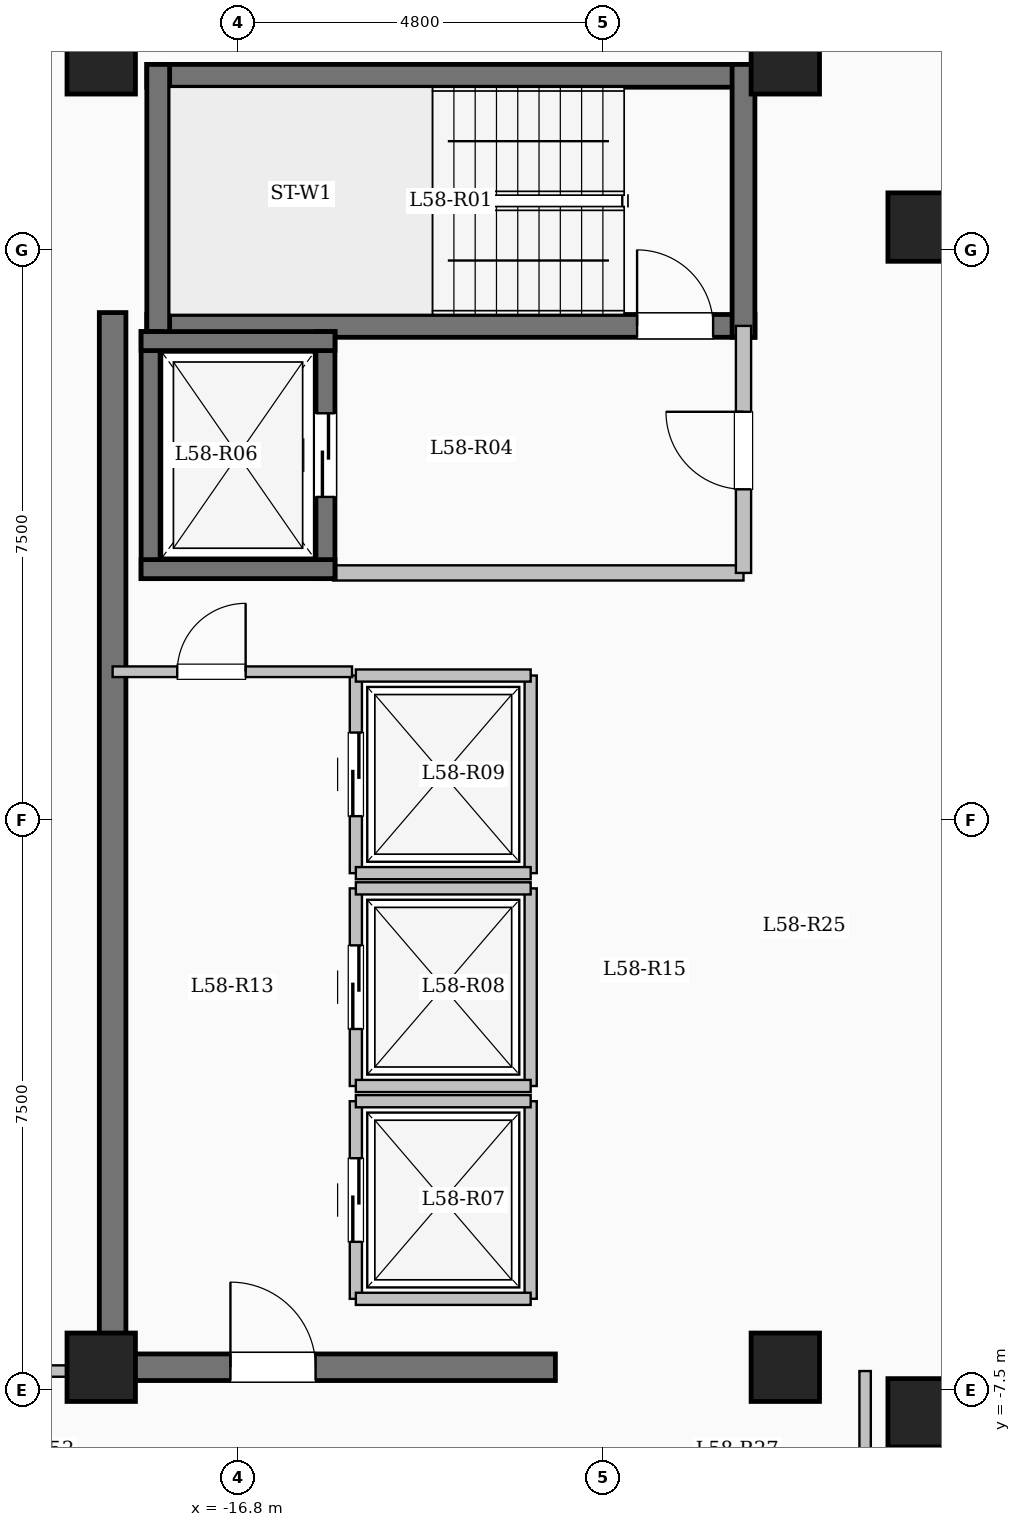
"""IFC4 building model, lengths in metres.
Left out: names, types, materials, properties, quantities, classifications, styles, units other than length and angle.
Written with IfcOpenShell. Run it as: python <this file> out.ifc"""

import sys

from ifc_helpers import new_model, si_unit, direction, frame, frame_2d, origin, origin_2d, place, context, subcontext, project, spatial, rectangle, extrude, element, fill, save


model = new_model("IFC4")
c1 = context("Model", 3, precision=1e-05, world=origin(), true_north=direction((0.0, 1.0)))
c2 = subcontext(c1, "Body", "Model", "MODEL_VIEW")
j1 = project(units=[si_unit("LENGTHUNIT", "METRE"), si_unit("PLANEANGLEUNIT", "RADIAN")], contexts=[c1])
p1 = place(None, origin())
s1 = spatial("IfcSite", under=j1, at=p1, CompositionType="ELEMENT")
p2 = place(p1, origin())
s2 = spatial("IfcBuilding", under=s1, at=p2, CompositionType="ELEMENT")
p3 = place(p2, frame((0.0, 0.0, 213.7)))
s3 = spatial("IfcBuildingStorey", under=s2, at=p3, CompositionType="ELEMENT", Elevation=213.7)
for number, where, z_axis, x_axis in (
    (1, (-7.8, -7.8, 0.0), (0.0, 0.0, 1.0), (1.0, 0.0, 0.0)),
    (2, (-7.8, 7.8, 0.0), (0.0, 0.0, 1.0), (1.0, 0.0, 0.0)),
    (3, (-9.6, -7.2, 0.0), (0.0, 0.0, 1.0), (1.0, 0.0, 0.0)),
    (4, (-9.6, 10.0, 0.0), (0.0, 0.0, 1.0), (1.0, 0.0, 0.0)),
    (5, (-18.6, -7.2, 0.0), (0.0, 0.0, 1.0), (1.0, 0.0, 0.0)),
    (6, (-18.6, 10.0, 0.0), (0.0, 0.0, 1.0), (1.0, 0.0, 0.0)),
):
    element("IfcColumn", number, at=place(p3, frame(where, z_axis=z_axis, x_axis=x_axis)), inside=s3, PredefinedType="COLUMN", context=c2, shape_type="SweptSolid", body=[
        extrude(rectangle(XDim=0.9, YDim=0.9, at=origin_2d()), origin(), (0.0, 0.0, 1.0), 3.35),
    ])
p4 = place(p3, frame((-18.0, 9.79, 0.0), z_axis=(0.0, 0.0, 1.0), x_axis=(1.0, 0.0, 0.0)))
e7 = element("IfcWall", 7, at=p4, inside=s3, PredefinedType="SHEAR", context=c2, shape_type="SweptSolid", body=[
    extrude(rectangle(XDim=8.0, YDim=0.3, at=frame_2d((4.0, 0.0))), origin(), (0.0, 0.0, 1.0), 3.35),
])
p5 = place(p3, frame((-18.0, 6.5, 0.0), z_axis=(0.0, 0.0, 1.0), x_axis=(1.0, 0.0, 0.0)))
e8 = element("IfcWall", 8, at=p5, inside=s3, PredefinedType="SHEAR", context=c2, shape_type="SweptSolid", body=[
    extrude(rectangle(XDim=8.0, YDim=0.3, at=frame_2d((4.0, 0.0))), origin(), (0.0, 0.0, 1.0), 3.35),
])
p6 = place(p5, frame((6.45, 0.0, 0.0)))
e9 = element("IfcOpeningElement", 9, at=p6, cuts=e8, PredefinedType="OPENING", context=c2, shape_type="SweptSolid", body=[
    extrude(rectangle(XDim=1.0, YDim=2.15, at=frame_2d((0.5, 1.075))), frame((0.0, 0.16, 0.0), z_axis=(0.0, -1.0, 0.0), x_axis=(1.0, 0.0, 0.0)), (0.0, 0.0, 1.0), 0.32),
])
for number, where, z_axis, x_axis in (
    (10, (-17.85, 6.35, 0.0), (0.0, 0.0, 1.0), (0.0, 1.0, 0.0)),
    (11, (-10.15, 6.35, 0.0), (0.0, 0.0, 1.0), (0.0, 1.0, 0.0)),
):
    element("IfcWall", number, at=place(p3, frame(where, z_axis=z_axis, x_axis=x_axis)), inside=s3, PredefinedType="SHEAR", context=c2, shape_type="SweptSolid", body=[
        extrude(rectangle(XDim=3.59, YDim=0.3, at=frame_2d((1.795, 0.0))), origin(), (0.0, 0.0, 1.0), 3.35),
    ])
p7 = place(p3, frame((-15.55, 3.25, 0.0), z_axis=(0.0, 0.0, 1.0), x_axis=(1.0, 0.0, 0.0)))
e12 = element("IfcWall", 12, at=p7, inside=s3, PredefinedType="SOLIDWALL", context=c2, shape_type="SweptSolid", body=[
    extrude(rectangle(XDim=5.4, YDim=0.2, at=frame_2d((2.7, 0.0))), origin(), (0.0, 0.0, 1.0), 3.1),
])
p8 = place(p3, frame((-10.15, 3.25, 0.0), z_axis=(0.0, 0.0, 1.0), x_axis=(0.0, 1.0, 0.0)))
e13 = element("IfcWall", 13, at=p8, inside=s3, PredefinedType="SOLIDWALL", context=c2, shape_type="SweptSolid", body=[
    extrude(rectangle(XDim=3.25, YDim=0.2, at=frame_2d((1.625, 0.0))), origin(), (0.0, 0.0, 1.0), 3.1),
])
p9 = place(p8, frame((1.1, 0.0, 0.0)))
e14 = element("IfcOpeningElement", 14, at=p9, cuts=e13, PredefinedType="OPENING", context=c2, shape_type="SweptSolid", body=[
    extrude(rectangle(XDim=1.02, YDim=2.15, at=frame_2d((0.51, 1.075))), frame((0.0, 0.11, 0.0), z_axis=(0.0, -1.0, 0.0), x_axis=(1.0, 0.0, 0.0)), (0.0, 0.0, 1.0), 0.22),
])
p10 = place(p3, frame((-17.95, 3.175, 0.0), z_axis=(0.0, 0.0, 1.0), x_axis=(0.0, 1.0, 0.0)))
e15 = element("IfcWall", 15, at=p10, inside=s3, PredefinedType="SHEAR", context=c2, shape_type="SweptSolid", body=[
    extrude(rectangle(XDim=3.25, YDim=0.25, at=frame_2d((1.625, 0.0))), origin(), (0.0, 0.0, 1.0), 3.35),
])
p11 = place(p3, frame((-15.65, 3.175, 0.0), z_axis=(0.0, 0.0, 1.0), x_axis=(0.0, 1.0, 0.0)))
e16 = element("IfcWall", 16, at=p11, inside=s3, PredefinedType="SHEAR", context=c2, shape_type="SweptSolid", body=[
    extrude(rectangle(XDim=3.25, YDim=0.25, at=frame_2d((1.625, 0.0))), origin(), (0.0, 0.0, 1.0), 3.35),
])
p12 = place(p11, frame((1.075, 0.0, 0.0)))
e17 = element("IfcOpeningElement", 17, at=p12, cuts=e16, PredefinedType="OPENING", context=c2, shape_type="SweptSolid", body=[
    extrude(rectangle(XDim=1.1, YDim=2.15, at=frame_2d((0.55, 1.075))), frame((0.0, 0.135, 0.0), z_axis=(0.0, -1.0, 0.0), x_axis=(1.0, 0.0, 0.0)), (0.0, 0.0, 1.0), 0.27),
])
for number, where, z_axis, x_axis in (
    (18, (-18.075, 3.3, 0.0), (0.0, 0.0, 1.0), (1.0, 0.0, 0.0)),
    (19, (-18.075, 6.3, 0.0), (0.0, 0.0, 1.0), (1.0, 0.0, 0.0)),
):
    element("IfcWall", number, at=place(p3, frame(where, z_axis=z_axis, x_axis=x_axis)), inside=s3, PredefinedType="SHEAR", context=c2, shape_type="SweptSolid", body=[
        extrude(rectangle(XDim=2.55, YDim=0.25, at=frame_2d((1.275, 0.0))), origin(), (0.0, 0.0, 1.0), 3.35),
    ])
p13 = place(p3, frame((-15.25, -6.3, 0.0), z_axis=(0.0, 0.0, 1.0), x_axis=(0.0, 1.0, 0.0)))
e20 = element("IfcWall", 20, at=p13, inside=s3, PredefinedType="SOLIDWALL", context=c2, shape_type="SweptSolid", body=[
    extrude(rectangle(XDim=2.6, YDim=0.16, at=frame_2d((1.3, 0.0))), origin(), (0.0, 0.0, 1.0), 3.1),
])
p14 = place(p13, frame((0.75, 0.0, 0.0)))
e21 = element("IfcOpeningElement", 21, at=p14, cuts=e20, PredefinedType="OPENING", context=c2, shape_type="SweptSolid", body=[
    extrude(rectangle(XDim=1.1, YDim=2.15, at=frame_2d((0.55, 1.075))), frame((0.0, 0.09, 0.0), z_axis=(0.0, -1.0, 0.0), x_axis=(1.0, 0.0, 0.0)), (0.0, 0.0, 1.0), 0.18),
])
p15 = place(p3, frame((-12.95, -6.3, 0.0), z_axis=(0.0, 0.0, 1.0), x_axis=(0.0, 1.0, 0.0)))
e22 = element("IfcWall", 22, at=p15, inside=s3, PredefinedType="SOLIDWALL", context=c2, shape_type="SweptSolid", body=[
    extrude(rectangle(XDim=2.6, YDim=0.16, at=frame_2d((1.3, 0.0))), origin(), (0.0, 0.0, 1.0), 3.1),
])
for number, where, z_axis, x_axis in (
    (23, (-15.25, -6.3, 0.0), (0.0, 0.0, 1.0), (1.0, 0.0, 0.0)),
    (24, (-15.25, -3.7, 0.0), (0.0, 0.0, 1.0), (1.0, 0.0, 0.0)),
):
    element("IfcWall", number, at=place(p3, frame(where, z_axis=z_axis, x_axis=x_axis)), inside=s3, PredefinedType="SOLIDWALL", context=c2, shape_type="SweptSolid", body=[
        extrude(rectangle(XDim=2.3, YDim=0.16, at=frame_2d((1.15, 0.0))), origin(), (0.0, 0.0, 1.0), 3.1),
    ])
p16 = place(p3, frame((-15.25, -3.5, 0.0), z_axis=(0.0, 0.0, 1.0), x_axis=(0.0, 1.0, 0.0)))
e25 = element("IfcWall", 25, at=p16, inside=s3, PredefinedType="SOLIDWALL", context=c2, shape_type="SweptSolid", body=[
    extrude(rectangle(XDim=2.6, YDim=0.16, at=frame_2d((1.3, 0.0))), origin(), (0.0, 0.0, 1.0), 3.1),
])
p17 = place(p16, frame((0.75, 0.0, 0.0)))
e26 = element("IfcOpeningElement", 26, at=p17, cuts=e25, PredefinedType="OPENING", context=c2, shape_type="SweptSolid", body=[
    extrude(rectangle(XDim=1.1, YDim=2.15, at=frame_2d((0.55, 1.075))), frame((0.0, 0.09, 0.0), z_axis=(0.0, -1.0, 0.0), x_axis=(1.0, 0.0, 0.0)), (0.0, 0.0, 1.0), 0.18),
])
p18 = place(p3, frame((-12.95, -3.5, 0.0), z_axis=(0.0, 0.0, 1.0), x_axis=(0.0, 1.0, 0.0)))
e27 = element("IfcWall", 27, at=p18, inside=s3, PredefinedType="SOLIDWALL", context=c2, shape_type="SweptSolid", body=[
    extrude(rectangle(XDim=2.6, YDim=0.16, at=frame_2d((1.3, 0.0))), origin(), (0.0, 0.0, 1.0), 3.1),
])
for number, where, z_axis, x_axis in (
    (28, (-15.25, -3.5, 0.0), (0.0, 0.0, 1.0), (1.0, 0.0, 0.0)),
    (29, (-15.25, -0.9, 0.0), (0.0, 0.0, 1.0), (1.0, 0.0, 0.0)),
):
    element("IfcWall", number, at=place(p3, frame(where, z_axis=z_axis, x_axis=x_axis)), inside=s3, PredefinedType="SOLIDWALL", context=c2, shape_type="SweptSolid", body=[
        extrude(rectangle(XDim=2.3, YDim=0.16, at=frame_2d((1.15, 0.0))), origin(), (0.0, 0.0, 1.0), 3.1),
    ])
p19 = place(p3, frame((-15.25, -0.7, 0.0), z_axis=(0.0, 0.0, 1.0), x_axis=(0.0, 1.0, 0.0)))
e30 = element("IfcWall", 30, at=p19, inside=s3, PredefinedType="SOLIDWALL", context=c2, shape_type="SweptSolid", body=[
    extrude(rectangle(XDim=2.6, YDim=0.16, at=frame_2d((1.3, 0.0))), origin(), (0.0, 0.0, 1.0), 3.1),
])
p20 = place(p19, frame((0.75, 0.0, 0.0)))
e31 = element("IfcOpeningElement", 31, at=p20, cuts=e30, PredefinedType="OPENING", context=c2, shape_type="SweptSolid", body=[
    extrude(rectangle(XDim=1.1, YDim=2.15, at=frame_2d((0.55, 1.075))), frame((0.0, 0.09, 0.0), z_axis=(0.0, -1.0, 0.0), x_axis=(1.0, 0.0, 0.0)), (0.0, 0.0, 1.0), 0.18),
])
p21 = place(p3, frame((-12.95, -0.7, 0.0), z_axis=(0.0, 0.0, 1.0), x_axis=(0.0, 1.0, 0.0)))
e32 = element("IfcWall", 32, at=p21, inside=s3, PredefinedType="SOLIDWALL", context=c2, shape_type="SweptSolid", body=[
    extrude(rectangle(XDim=2.6, YDim=0.16, at=frame_2d((1.3, 0.0))), origin(), (0.0, 0.0, 1.0), 3.1),
])
for number, where, z_axis, x_axis in (
    (33, (-15.25, -0.7, 0.0), (0.0, 0.0, 1.0), (1.0, 0.0, 0.0)),
    (34, (-15.25, 1.9, 0.0), (0.0, 0.0, 1.0), (1.0, 0.0, 0.0)),
):
    element("IfcWall", number, at=place(p3, frame(where, z_axis=z_axis, x_axis=x_axis)), inside=s3, PredefinedType="SOLIDWALL", context=c2, shape_type="SweptSolid", body=[
        extrude(rectangle(XDim=2.3, YDim=0.16, at=frame_2d((1.15, 0.0))), origin(), (0.0, 0.0, 1.0), 3.1),
    ])
p22 = place(p3, frame((-18.45, -7.375, 0.0), z_axis=(0.0, 0.0, 1.0), x_axis=(0.0, 1.0, 0.0)))
e35 = element("IfcWall", 35, at=p22, inside=s3, PredefinedType="SHEAR", context=c2, shape_type="SweptSolid", body=[
    extrude(rectangle(XDim=14.05, YDim=0.35, at=frame_2d((7.025, 0.0))), origin(), (0.0, 0.0, 1.0), 3.35),
])
p23 = place(p3, frame((-18.625, -7.2, 0.0), z_axis=(0.0, 0.0, 1.0), x_axis=(1.0, 0.0, 0.0)))
e36 = element("IfcWall", 36, at=p23, inside=s3, PredefinedType="SHEAR", context=c2, shape_type="SweptSolid", body=[
    extrude(rectangle(XDim=6.0, YDim=0.35, at=frame_2d((3.0, 0.0))), origin(), (0.0, 0.0, 1.0), 3.35),
])
p24 = place(p23, frame((1.725, 0.0, 0.0)))
e37 = element("IfcOpeningElement", 37, at=p24, cuts=e36, PredefinedType="OPENING", context=c2, shape_type="SweptSolid", body=[
    extrude(rectangle(XDim=1.12, YDim=2.15, at=frame_2d((0.56, 1.075))), frame((0.0, 0.185, 0.0), z_axis=(0.0, -1.0, 0.0), x_axis=(1.0, 0.0, 0.0)), (0.0, 0.0, 1.0), 0.37),
])
p25 = place(p3, frame((-18.45, 1.95, 0.0), z_axis=(0.0, 0.0, 1.0), x_axis=(1.0, 0.0, 0.0)))
e38 = element("IfcWall", 38, at=p25, inside=s3, PredefinedType="PARTITIONING", context=c2, shape_type="SweptSolid", body=[
    extrude(rectangle(XDim=3.15, YDim=0.14, at=frame_2d((1.575, 0.0))), origin(), (0.0, 0.0, 1.0), 3.1),
])
p26 = place(p25, frame((0.85, 0.0, 0.0)))
e39 = element("IfcOpeningElement", 39, at=p26, cuts=e38, PredefinedType="OPENING", context=c2, shape_type="SweptSolid", body=[
    extrude(rectangle(XDim=0.9, YDim=2.08, at=frame_2d((0.45, 1.04))), frame((0.0, 0.08, 0.0), z_axis=(0.0, -1.0, 0.0), x_axis=(1.0, 0.0, 0.0)), (0.0, 0.0, 1.0), 0.16),
])
p27 = place(p3, frame((-8.55, -9.4, 0.0), z_axis=(0.0, 0.0, 1.0), x_axis=(0.0, 1.0, 0.0)))
e40 = element("IfcWall", 40, at=p27, inside=s3, PredefinedType="PARTITIONING", context=c2, shape_type="SweptSolid", body=[
    extrude(rectangle(XDim=2.15, YDim=0.15, at=frame_2d((1.075, 0.0))), origin(), (0.0, 0.0, 1.0), 3.1),
])
p28 = place(p3, frame((-23.58, -7.25, 0.0), z_axis=(0.0, 0.0, 1.0), x_axis=(1.0, 0.0, 0.0)))
e41 = element("IfcWall", 41, at=p28, inside=s3, PredefinedType="PARTITIONING", context=c2, shape_type="SweptSolid", body=[
    extrude(rectangle(XDim=5.13, YDim=0.15, at=frame_2d((2.565, 0.0))), origin(), (0.0, 0.0, 1.0), 3.1),
])
p29 = place(p28, frame((2.08, 0.0, 0.0)))
e42 = element("IfcOpeningElement", 42, at=p29, cuts=e41, PredefinedType="OPENING", context=c2, shape_type="SweptSolid", body=[
    extrude(rectangle(XDim=1.08, YDim=2.15, at=frame_2d((0.54, 1.075))), frame((0.0, 0.085, 0.0), z_axis=(0.0, -1.0, 0.0), x_axis=(1.0, 0.0, 0.0)), (0.0, 0.0, 1.0), 0.17),
])
p30 = place(p6, origin())
e43 = element("IfcDoor", 43, at=p30, inside=s3, OperationType="SINGLE_SWING_LEFT", PredefinedType="DOOR", context=c2, shape_type="SweptSolid", body=[
    extrude(rectangle(XDim=1.0, YDim=2.15, at=frame_2d((0.5, 1.075))), frame((0.0, 0.025, 0.0), z_axis=(0.0, -1.0, 0.0), x_axis=(1.0, 0.0, 0.0)), (0.0, 0.0, 1.0), 0.05),
])
fill(e9, e43)
p31 = place(p9, origin())
e44 = element("IfcDoor", 44, at=p31, inside=s3, OperationType="SINGLE_SWING_RIGHT", PredefinedType="DOOR", context=c2, shape_type="SweptSolid", body=[
    extrude(rectangle(XDim=1.02, YDim=2.15, at=frame_2d((0.51, 1.075))), frame((0.0, 0.025, 0.0), z_axis=(0.0, -1.0, 0.0), x_axis=(1.0, 0.0, 0.0)), (0.0, 0.0, 1.0), 0.05),
])
fill(e14, e44)
p32 = place(p12, origin())
e45 = element("IfcDoor", 45, at=p32, inside=s3, OperationType="SLIDING_TO_LEFT", PredefinedType="DOOR", context=c2, shape_type="SweptSolid", body=[
    extrude(rectangle(XDim=1.1, YDim=2.15, at=frame_2d((0.55, 1.075))), frame((0.0, 0.025, 0.0), z_axis=(0.0, -1.0, 0.0), x_axis=(1.0, 0.0, 0.0)), (0.0, 0.0, 1.0), 0.05),
])
fill(e17, e45)
p33 = place(p14, origin())
e46 = element("IfcDoor", 46, at=p33, inside=s3, OperationType="SLIDING_TO_LEFT", PredefinedType="DOOR", context=c2, shape_type="SweptSolid", body=[
    extrude(rectangle(XDim=1.1, YDim=2.15, at=frame_2d((0.55, 1.075))), frame((0.0, 0.025, 0.0), z_axis=(0.0, -1.0, 0.0), x_axis=(1.0, 0.0, 0.0)), (0.0, 0.0, 1.0), 0.05),
])
fill(e21, e46)
p34 = place(p17, origin())
e47 = element("IfcDoor", 47, at=p34, inside=s3, OperationType="SLIDING_TO_LEFT", PredefinedType="DOOR", context=c2, shape_type="SweptSolid", body=[
    extrude(rectangle(XDim=1.1, YDim=2.15, at=frame_2d((0.55, 1.075))), frame((0.0, 0.025, 0.0), z_axis=(0.0, -1.0, 0.0), x_axis=(1.0, 0.0, 0.0)), (0.0, 0.0, 1.0), 0.05),
])
fill(e26, e47)
p35 = place(p20, origin())
e48 = element("IfcDoor", 48, at=p35, inside=s3, OperationType="SLIDING_TO_LEFT", PredefinedType="DOOR", context=c2, shape_type="SweptSolid", body=[
    extrude(rectangle(XDim=1.1, YDim=2.15, at=frame_2d((0.55, 1.075))), frame((0.0, 0.025, 0.0), z_axis=(0.0, -1.0, 0.0), x_axis=(1.0, 0.0, 0.0)), (0.0, 0.0, 1.0), 0.05),
])
fill(e31, e48)
p36 = place(p24, origin())
e49 = element("IfcDoor", 49, at=p36, inside=s3, OperationType="SINGLE_SWING_LEFT", PredefinedType="DOOR", context=c2, shape_type="SweptSolid", body=[
    extrude(rectangle(XDim=1.12, YDim=2.15, at=frame_2d((0.56, 1.075))), frame((0.0, 0.025, 0.0), z_axis=(0.0, -1.0, 0.0), x_axis=(1.0, 0.0, 0.0)), (0.0, 0.0, 1.0), 0.05),
])
fill(e37, e49)
p37 = place(p26, origin())
e50 = element("IfcDoor", 50, at=p37, inside=s3, OperationType="SINGLE_SWING_RIGHT", PredefinedType="DOOR", context=c2, shape_type="SweptSolid", body=[
    extrude(rectangle(XDim=0.9, YDim=2.08, at=frame_2d((0.45, 1.04))), frame((0.0, 0.025, 0.0), z_axis=(0.0, -1.0, 0.0), x_axis=(1.0, 0.0, 0.0)), (0.0, 0.0, 1.0), 0.05),
])
fill(e39, e50)
save(model, sys.argv[1])
